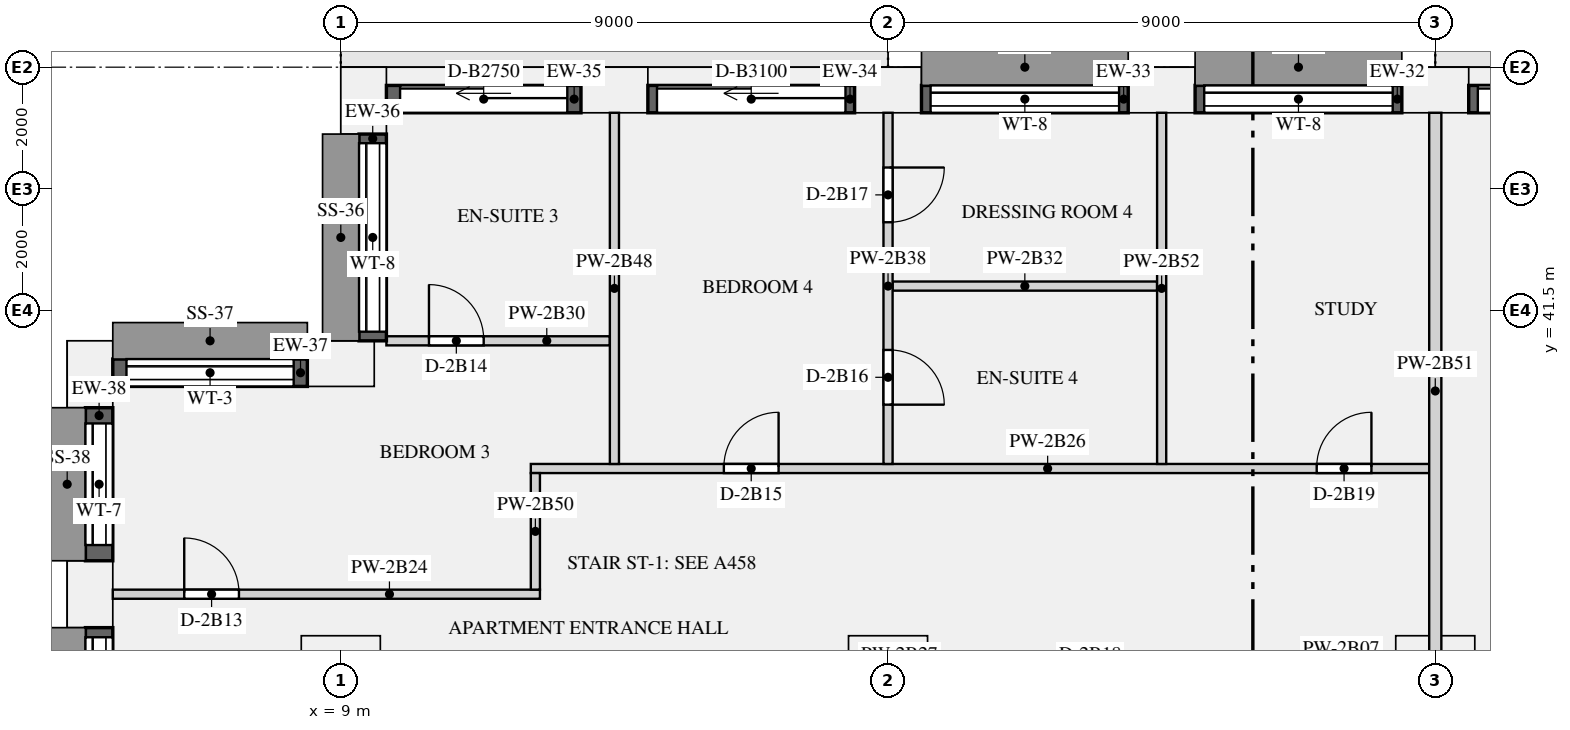
"""IFC4 building model, lengths in metres.
Left out: names, types, materials, properties, quantities, classifications, styles, units other than length and angle.
Written with IfcOpenShell. Run it as: python <this file> out.ifc"""

import sys

from ifc_helpers import new_model, si_unit, direction, frame, frame_2d, origin, origin_2d, place, context, subcontext, project, spatial, rectangle, extrude, element, fill, save


model = new_model("IFC4")
c1 = context("Model", 3, precision=1e-05, world=origin(), true_north=direction((0.0, 1.0)))
c2 = subcontext(c1, "Body", "Model", "MODEL_VIEW")
j1 = project(units=[si_unit("LENGTHUNIT", "METRE"), si_unit("PLANEANGLEUNIT", "RADIAN")], contexts=[c1])
p1 = place(None, origin())
s1 = spatial("IfcSite", under=j1, at=p1, CompositionType="ELEMENT")
p2 = place(p1, origin())
s2 = spatial("IfcBuilding", under=s1, at=p2, CompositionType="ELEMENT")
p3 = place(p2, frame((0.0, 0.0, 93.0)))
s3 = spatial("IfcBuildingStorey", under=s2, at=p3, CompositionType="ELEMENT", Elevation=93.0)
for number, where, z_axis, x_axis in (
    (1, (27.0, 45.125, 0.0), (0.0, 0.0, 1.0), (-1.0, 0.0, 0.0)),
    (2, (22.5, 45.125, 0.0), (0.0, 0.0, 1.0), (-1.0, 0.0, 0.0)),
    (3, (18.0, 45.125, 0.0), (0.0, 0.0, 1.0), (-1.0, 0.0, 0.0)),
    (4, (13.5, 45.125, 0.0), (0.0, 0.0, 1.0), (-1.0, 0.0, 0.0)),
    (5, (9.375, 44.95, 0.0), (0.0, 0.0, 1.0), (0.0, -1.0, 0.0)),
    (6, (9.0, 40.625, 0.0), (0.0, 0.0, 1.0), (-1.0, 0.0, 0.0)),
    (7, (4.875, 40.45, 0.0), (0.0, 0.0, 1.0), (0.0, -1.0, 0.0)),
    (8, (4.875, 36.833, 0.0), (0.0, 0.0, 1.0), (0.0, -1.0, 0.0)),
):
    element("IfcColumn", number, at=place(p3, frame(where, z_axis=z_axis, x_axis=x_axis)), inside=s3, PredefinedType="USERDEFINED", context=c2, shape_type="SweptSolid", body=[
        extrude(rectangle(XDim=1.1, YDim=0.75, at=origin_2d()), origin(), (0.0, 0.0, 1.0), 3.15),
    ])
for number, where, z_axis, x_axis in (
    (9, (9.0, 35.5, 0.0), (0.0, 0.0, 1.0), (1.0, 0.0, 0.0)),
    (10, (18.0, 35.5, 0.0), (0.0, 0.0, 1.0), (1.0, 0.0, 0.0)),
    (11, (27.0, 35.5, 0.0), (0.0, 0.0, 1.0), (1.0, 0.0, 0.0)),
):
    element("IfcColumn", number, at=place(p3, frame(where, z_axis=z_axis, x_axis=x_axis)), inside=s3, PredefinedType="COLUMN", context=c2, shape_type="SweptSolid", body=[
        extrude(rectangle(XDim=1.3, YDim=1.3, at=origin_2d()), origin(), (0.0, 0.0, 1.0), 3.15),
    ])
p4 = place(p3, frame((30.95, 44.975, 0.0), z_axis=(0.0, 0.0, 1.0), x_axis=(-1.0, 0.0, 0.0)))
e12 = element("IfcWall", 12, at=p4, inside=s3, PredefinedType="SOLIDWALL", context=c2, shape_type="SweptSolid", body=[
    extrude(rectangle(XDim=3.4, YDim=0.45, at=frame_2d((1.7, 0.0))), origin(), (0.0, 0.0, 1.0), 2.83),
])
p5 = place(p4, frame((0.15, 0.0, 0.0)))
e13 = element("IfcOpeningElement", 13, at=p5, cuts=e12, PredefinedType="OPENING", context=c2, shape_type="SweptSolid", body=[
    extrude(rectangle(XDim=3.1, YDim=2.3, at=frame_2d((1.55, 1.15))), frame((0.0, 0.235, 0.0), z_axis=(0.0, -1.0, 0.0), x_axis=(1.0, 0.0, 0.0)), (0.0, 0.0, 1.0), 0.47),
])
p6 = place(p3, frame((26.45, 44.975, 0.9), z_axis=(0.0, 0.0, 1.0), x_axis=(-1.0, 0.0, 0.0)))
e14 = element("IfcWall", 14, at=p6, inside=s3, PredefinedType="SOLIDWALL", context=c2, shape_type="SweptSolid", body=[
    extrude(rectangle(XDim=3.4, YDim=0.45, at=frame_2d((1.7, 0.0))), origin(), (0.0, 0.0, 1.0), 1.93),
])
p7 = place(p6, frame((0.15, 0.0, 0.15)))
e15 = element("IfcOpeningElement", 15, at=p7, cuts=e14, PredefinedType="OPENING", context=c2, shape_type="SweptSolid", body=[
    extrude(rectangle(XDim=3.1, YDim=1.5, at=frame_2d((1.55, 0.75))), frame((0.0, 0.235, 0.0), z_axis=(0.0, -1.0, 0.0), x_axis=(1.0, 0.0, 0.0)), (0.0, 0.0, 1.0), 0.47),
])
p8 = place(p3, frame((21.95, 44.975, 0.9), z_axis=(0.0, 0.0, 1.0), x_axis=(-1.0, 0.0, 0.0)))
e16 = element("IfcWall", 16, at=p8, inside=s3, PredefinedType="SOLIDWALL", context=c2, shape_type="SweptSolid", body=[
    extrude(rectangle(XDim=3.4, YDim=0.45, at=frame_2d((1.7, 0.0))), origin(), (0.0, 0.0, 1.0), 1.93),
])
p9 = place(p8, frame((0.15, 0.0, 0.15)))
e17 = element("IfcOpeningElement", 17, at=p9, cuts=e16, PredefinedType="OPENING", context=c2, shape_type="SweptSolid", body=[
    extrude(rectangle(XDim=3.1, YDim=1.5, at=frame_2d((1.55, 0.75))), frame((0.0, 0.235, 0.0), z_axis=(0.0, -1.0, 0.0), x_axis=(1.0, 0.0, 0.0)), (0.0, 0.0, 1.0), 0.47),
])
p10 = place(p3, frame((17.45, 44.975, 0.0), z_axis=(0.0, 0.0, 1.0), x_axis=(-1.0, 0.0, 0.0)))
e18 = element("IfcWall", 18, at=p10, inside=s3, PredefinedType="SOLIDWALL", context=c2, shape_type="SweptSolid", body=[
    extrude(rectangle(XDim=3.4, YDim=0.45, at=frame_2d((1.7, 0.0))), origin(), (0.0, 0.0, 1.0), 2.83),
])
p11 = place(p10, frame((0.15, 0.0, 0.0)))
e19 = element("IfcOpeningElement", 19, at=p11, cuts=e18, PredefinedType="OPENING", context=c2, shape_type="SweptSolid", body=[
    extrude(rectangle(XDim=3.1, YDim=2.3, at=frame_2d((1.55, 1.15))), frame((0.0, 0.235, 0.0), z_axis=(0.0, -1.0, 0.0), x_axis=(1.0, 0.0, 0.0)), (0.0, 0.0, 1.0), 0.47),
])
p12 = place(p3, frame((12.95, 44.975, 0.0), z_axis=(0.0, 0.0, 1.0), x_axis=(-1.0, 0.0, 0.0)))
e20 = element("IfcWall", 20, at=p12, inside=s3, PredefinedType="SOLIDWALL", context=c2, shape_type="SweptSolid", body=[
    extrude(rectangle(XDim=3.2, YDim=0.45, at=frame_2d((1.6, 0.0))), origin(), (0.0, 0.0, 1.0), 2.83),
])
p13 = place(p12, frame((0.225, 0.0, 0.0)))
e21 = element("IfcOpeningElement", 21, at=p13, cuts=e20, PredefinedType="OPENING", context=c2, shape_type="SweptSolid", body=[
    extrude(rectangle(XDim=2.75, YDim=2.3, at=frame_2d((1.375, 1.15))), frame((0.0, 0.235, 0.0), z_axis=(0.0, -1.0, 0.0), x_axis=(1.0, 0.0, 0.0)), (0.0, 0.0, 1.0), 0.47),
])
p14 = place(p3, frame((9.525, 44.4, 0.9), z_axis=(0.0, 0.0, 1.0), x_axis=(0.0, -1.0, 0.0)))
e22 = element("IfcWall", 22, at=p14, inside=s3, PredefinedType="SOLIDWALL", context=c2, shape_type="SweptSolid", body=[
    extrude(rectangle(XDim=3.4, YDim=0.45, at=frame_2d((1.7, 0.0))), origin(), (0.0, 0.0, 1.0), 1.93),
])
p15 = place(p14, frame((0.15, 0.0, 0.15)))
e23 = element("IfcOpeningElement", 23, at=p15, cuts=e22, PredefinedType="OPENING", context=c2, shape_type="SweptSolid", body=[
    extrude(rectangle(XDim=3.1, YDim=1.5, at=frame_2d((1.55, 0.75))), frame((0.0, 0.235, 0.0), z_axis=(0.0, -1.0, 0.0), x_axis=(1.0, 0.0, 0.0)), (0.0, 0.0, 1.0), 0.47),
])
p16 = place(p3, frame((8.45, 40.475, 0.9), z_axis=(0.0, 0.0, 1.0), x_axis=(-1.0, 0.0, 0.0)))
e24 = element("IfcWall", 24, at=p16, inside=s3, PredefinedType="SOLIDWALL", context=c2, shape_type="SweptSolid", body=[
    extrude(rectangle(XDim=3.2, YDim=0.45, at=frame_2d((1.6, 0.0))), origin(), (0.0, 0.0, 1.0), 1.93),
])
p17 = place(p16, frame((0.225, 0.0, 0.15)))
e25 = element("IfcOpeningElement", 25, at=p17, cuts=e24, PredefinedType="OPENING", context=c2, shape_type="SweptSolid", body=[
    extrude(rectangle(XDim=2.75, YDim=1.5, at=frame_2d((1.375, 0.75))), frame((0.0, 0.235, 0.0), z_axis=(0.0, -1.0, 0.0), x_axis=(1.0, 0.0, 0.0)), (0.0, 0.0, 1.0), 0.47),
])
p18 = place(p3, frame((5.025, 39.9, 0.9), z_axis=(0.0, 0.0, 1.0), x_axis=(0.0, -1.0, 0.0)))
e26 = element("IfcWall", 26, at=p18, inside=s3, PredefinedType="SOLIDWALL", context=c2, shape_type="SweptSolid", body=[
    extrude(rectangle(XDim=2.517, YDim=0.45, at=frame_2d((1.258, 0.0))), origin(), (0.0, 0.0, 1.0), 1.93),
])
p19 = place(p18, frame((0.259, 0.0, 0.15)))
e27 = element("IfcOpeningElement", 27, at=p19, cuts=e26, PredefinedType="OPENING", context=c2, shape_type="SweptSolid", body=[
    extrude(rectangle(XDim=2.0, YDim=1.5, at=frame_2d((1.0, 0.75))), frame((0.0, 0.235, 0.0), z_axis=(0.0, -1.0, 0.0), x_axis=(1.0, 0.0, 0.0)), (0.0, 0.0, 1.0), 0.47),
])
p20 = place(p3, frame((5.025, 36.283, 0.9), z_axis=(0.0, 0.0, 1.0), x_axis=(0.0, -1.0, 0.0)))
e28 = element("IfcWall", 28, at=p20, inside=s3, PredefinedType="SOLIDWALL", context=c2, shape_type="SweptSolid", body=[
    extrude(rectangle(XDim=3.066, YDim=0.45, at=frame_2d((1.533, 0.0))), origin(), (0.0, 0.0, 1.0), 1.93),
])
p21 = place(p20, frame((0.158, 0.0, 0.15)))
e29 = element("IfcOpeningElement", 29, at=p21, cuts=e28, PredefinedType="OPENING", context=c2, shape_type="SweptSolid", body=[
    extrude(rectangle(XDim=2.75, YDim=1.5, at=frame_2d((1.375, 0.75))), frame((0.0, 0.235, 0.0), z_axis=(0.0, -1.0, 0.0), x_axis=(1.0, 0.0, 0.0)), (0.0, 0.0, 1.0), 0.47),
])
p22 = place(p3, frame((5.25, 36.833, 0.0), z_axis=(0.0, 0.0, 1.0), x_axis=(1.0, 0.0, 0.0)))
e30 = element("IfcWall", 30, at=p22, inside=s3, PredefinedType="PARTITIONING", context=c2, shape_type="SweptSolid", body=[
    extrude(rectangle(XDim=7.025, YDim=0.15, at=frame_2d((3.512, 0.0))), origin(), (0.0, 0.0, 1.0), 2.83),
])
p23 = place(p22, frame((1.175, 0.0, 0.0)))
e31 = element("IfcOpeningElement", 31, at=p23, cuts=e30, PredefinedType="OPENING", context=c2, shape_type="SweptSolid", body=[
    extrude(rectangle(XDim=0.9, YDim=2.1, at=frame_2d((0.45, 1.05))), frame((0.0, 0.085, 0.0), z_axis=(0.0, -1.0, 0.0), x_axis=(1.0, 0.0, 0.0)), (0.0, 0.0, 1.0), 0.17),
])
p24 = place(p3, frame((12.125, 38.9, 0.0), z_axis=(0.0, 0.0, 1.0), x_axis=(1.0, 0.0, 0.0)))
e32 = element("IfcWall", 32, at=p24, inside=s3, PredefinedType="PARTITIONING", context=c2, shape_type="SweptSolid", body=[
    extrude(rectangle(XDim=14.775, YDim=0.15, at=frame_2d((7.387, 0.0))), origin(), (0.0, 0.0, 1.0), 2.83),
])
p25 = place(p24, frame((3.175, 0.0, 0.0)))
e33 = element("IfcOpeningElement", 33, at=p25, cuts=e32, PredefinedType="OPENING", context=c2, shape_type="SweptSolid", body=[
    extrude(rectangle(XDim=0.9, YDim=2.1, at=frame_2d((0.45, 1.05))), frame((0.0, 0.085, 0.0), z_axis=(0.0, -1.0, 0.0), x_axis=(1.0, 0.0, 0.0)), (0.0, 0.0, 1.0), 0.17),
])
p26 = place(p24, frame((12.925, 0.0, 0.0)))
e34 = element("IfcOpeningElement", 34, at=p26, cuts=e32, PredefinedType="OPENING", context=c2, shape_type="SweptSolid", body=[
    extrude(rectangle(XDim=0.9, YDim=2.1, at=frame_2d((0.45, 1.05))), frame((0.0, 0.085, 0.0), z_axis=(0.0, -1.0, 0.0), x_axis=(1.0, 0.0, 0.0)), (0.0, 0.0, 1.0), 0.17),
])
p27 = place(p3, frame((9.75, 41.0, 0.0), z_axis=(0.0, 0.0, 1.0), x_axis=(1.0, 0.0, 0.0)))
e35 = element("IfcWall", 35, at=p27, inside=s3, PredefinedType="PARTITIONING", context=c2, shape_type="SweptSolid", body=[
    extrude(rectangle(XDim=3.675, YDim=0.15, at=frame_2d((1.837, 0.0))), origin(), (0.0, 0.0, 1.0), 2.83),
])
p28 = place(p27, frame((0.7, 0.0, 0.0)))
e36 = element("IfcOpeningElement", 36, at=p28, cuts=e35, PredefinedType="OPENING", context=c2, shape_type="SweptSolid", body=[
    extrude(rectangle(XDim=0.9, YDim=2.1, at=frame_2d((0.45, 1.05))), frame((0.0, 0.085, 0.0), z_axis=(0.0, -1.0, 0.0), x_axis=(1.0, 0.0, 0.0)), (0.0, 0.0, 1.0), 0.17),
])
p29 = place(p3, frame((18.075, 41.9, 0.0), z_axis=(0.0, 0.0, 1.0), x_axis=(1.0, 0.0, 0.0)))
e37 = element("IfcWall", 37, at=p29, inside=s3, PredefinedType="PARTITIONING", context=c2, shape_type="SweptSolid", body=[
    extrude(rectangle(XDim=4.35, YDim=0.15, at=frame_2d((2.175, 0.0))), origin(), (0.0, 0.0, 1.0), 2.83),
])
p30 = place(p3, frame((18.0, 38.975, 0.0), z_axis=(0.0, 0.0, 1.0), x_axis=(0.0, 1.0, 0.0)))
e38 = element("IfcWall", 38, at=p30, inside=s3, PredefinedType="PARTITIONING", context=c2, shape_type="SweptSolid", body=[
    extrude(rectangle(XDim=5.775, YDim=0.15, at=frame_2d((2.887, 0.0))), origin(), (0.0, 0.0, 1.0), 2.83),
])
p31 = place(p30, frame((0.975, 0.0, 0.0)))
e39 = element("IfcOpeningElement", 39, at=p31, cuts=e38, PredefinedType="OPENING", context=c2, shape_type="SweptSolid", body=[
    extrude(rectangle(XDim=0.9, YDim=2.1, at=frame_2d((0.45, 1.05))), frame((0.0, 0.085, 0.0), z_axis=(0.0, -1.0, 0.0), x_axis=(1.0, 0.0, 0.0)), (0.0, 0.0, 1.0), 0.17),
])
p32 = place(p30, frame((3.975, 0.0, 0.0)))
e40 = element("IfcOpeningElement", 40, at=p32, cuts=e38, PredefinedType="OPENING", context=c2, shape_type="SweptSolid", body=[
    extrude(rectangle(XDim=0.9, YDim=2.1, at=frame_2d((0.45, 1.05))), frame((0.0, 0.085, 0.0), z_axis=(0.0, -1.0, 0.0), x_axis=(1.0, 0.0, 0.0)), (0.0, 0.0, 1.0), 0.17),
])
p33 = place(p3, frame((13.5, 38.975, 0.0), z_axis=(0.0, 0.0, 1.0), x_axis=(0.0, 1.0, 0.0)))
e41 = element("IfcWall", 41, at=p33, inside=s3, PredefinedType="PARTITIONING", context=c2, shape_type="SweptSolid", body=[
    extrude(rectangle(XDim=5.775, YDim=0.15, at=frame_2d((2.887, 0.0))), origin(), (0.0, 0.0, 1.0), 2.83),
])
p34 = place(p3, frame((12.2, 36.908, 0.0), z_axis=(0.0, 0.0, 1.0), x_axis=(0.0, 1.0, 0.0)))
e42 = element("IfcWall", 42, at=p34, inside=s3, PredefinedType="PARTITIONING", context=c2, shape_type="SweptSolid", body=[
    extrude(rectangle(XDim=1.917, YDim=0.15, at=frame_2d((0.958, 0.0))), origin(), (0.0, 0.0, 1.0), 2.83),
])
p35 = place(p3, frame((27.0, 35.6, 0.0), z_axis=(0.0, 0.0, 1.0), x_axis=(0.0, 1.0, 0.0)))
e43 = element("IfcWall", 43, at=p35, inside=s3, PredefinedType="PARTITIONING", context=c2, shape_type="SweptSolid", body=[
    extrude(rectangle(XDim=9.15, YDim=0.2, at=frame_2d((4.575, 0.0))), origin(), (0.0, 0.0, 1.0), 2.83),
])
p36 = place(p3, frame((22.5, 38.975, 0.0), z_axis=(0.0, 0.0, 1.0), x_axis=(0.0, 1.0, 0.0)))
e44 = element("IfcWall", 44, at=p36, inside=s3, PredefinedType="PARTITIONING", context=c2, shape_type="SweptSolid", body=[
    extrude(rectangle(XDim=5.775, YDim=0.15, at=frame_2d((2.887, 0.0))), origin(), (0.0, 0.0, 1.0), 2.83),
])
p37 = place(p5, origin())
e45 = element("IfcDoor", 45, at=p37, inside=s3, OperationType="SLIDING_TO_LEFT", PredefinedType="DOOR", context=c2, shape_type="SweptSolid", body=[
    extrude(rectangle(XDim=3.1, YDim=2.3, at=frame_2d((1.55, 1.15))), frame((0.0, -0.07, 0.0), z_axis=(0.0, -1.0, 0.0), x_axis=(1.0, 0.0, 0.0)), (0.0, 0.0, 1.0), 0.05),
])
fill(e13, e45)
p38 = place(p7, origin())
e46 = element("IfcWindow", 46, at=p38, inside=s3, PartitioningType="SINGLE_PANEL", PredefinedType="WINDOW", context=c2, shape_type="SweptSolid", body=[
    extrude(rectangle(XDim=3.1, YDim=1.5, at=frame_2d((1.55, 0.75))), frame((0.0, -0.065, 0.0), z_axis=(0.0, -1.0, 0.0), x_axis=(1.0, 0.0, 0.0)), (0.0, 0.0, 1.0), 0.06),
])
fill(e15, e46)
p39 = place(p9, origin())
e47 = element("IfcWindow", 47, at=p39, inside=s3, PartitioningType="SINGLE_PANEL", PredefinedType="WINDOW", context=c2, shape_type="SweptSolid", body=[
    extrude(rectangle(XDim=3.1, YDim=1.5, at=frame_2d((1.55, 0.75))), frame((0.0, -0.065, 0.0), z_axis=(0.0, -1.0, 0.0), x_axis=(1.0, 0.0, 0.0)), (0.0, 0.0, 1.0), 0.06),
])
fill(e17, e47)
p40 = place(p11, origin())
e48 = element("IfcDoor", 48, at=p40, inside=s3, OperationType="SLIDING_TO_LEFT", PredefinedType="DOOR", context=c2, shape_type="SweptSolid", body=[
    extrude(rectangle(XDim=3.1, YDim=2.3, at=frame_2d((1.55, 1.15))), frame((0.0, -0.07, 0.0), z_axis=(0.0, -1.0, 0.0), x_axis=(1.0, 0.0, 0.0)), (0.0, 0.0, 1.0), 0.05),
])
fill(e19, e48)
p41 = place(p13, origin())
e49 = element("IfcDoor", 49, at=p41, inside=s3, OperationType="SLIDING_TO_LEFT", PredefinedType="DOOR", context=c2, shape_type="SweptSolid", body=[
    extrude(rectangle(XDim=2.75, YDim=2.3, at=frame_2d((1.375, 1.15))), frame((0.0, -0.07, 0.0), z_axis=(0.0, -1.0, 0.0), x_axis=(1.0, 0.0, 0.0)), (0.0, 0.0, 1.0), 0.05),
])
fill(e21, e49)
p42 = place(p15, origin())
e50 = element("IfcWindow", 50, at=p42, inside=s3, PartitioningType="SINGLE_PANEL", PredefinedType="WINDOW", context=c2, shape_type="SweptSolid", body=[
    extrude(rectangle(XDim=3.1, YDim=1.5, at=frame_2d((1.55, 0.75))), frame((0.0, -0.065, 0.0), z_axis=(0.0, -1.0, 0.0), x_axis=(1.0, 0.0, 0.0)), (0.0, 0.0, 1.0), 0.06),
])
fill(e23, e50)
p43 = place(p17, origin())
e51 = element("IfcWindow", 51, at=p43, inside=s3, PartitioningType="SINGLE_PANEL", PredefinedType="WINDOW", context=c2, shape_type="SweptSolid", body=[
    extrude(rectangle(XDim=2.75, YDim=1.5, at=frame_2d((1.375, 0.75))), frame((0.0, -0.065, 0.0), z_axis=(0.0, -1.0, 0.0), x_axis=(1.0, 0.0, 0.0)), (0.0, 0.0, 1.0), 0.06),
])
fill(e25, e51)
p44 = place(p19, origin())
e52 = element("IfcWindow", 52, at=p44, inside=s3, PartitioningType="SINGLE_PANEL", PredefinedType="WINDOW", context=c2, shape_type="SweptSolid", body=[
    extrude(rectangle(XDim=2.0, YDim=1.5, at=frame_2d((1.0, 0.75))), frame((0.0, -0.065, 0.0), z_axis=(0.0, -1.0, 0.0), x_axis=(1.0, 0.0, 0.0)), (0.0, 0.0, 1.0), 0.06),
])
fill(e27, e52)
p45 = place(p21, origin())
e53 = element("IfcWindow", 53, at=p45, inside=s3, PartitioningType="SINGLE_PANEL", PredefinedType="WINDOW", context=c2, shape_type="SweptSolid", body=[
    extrude(rectangle(XDim=2.75, YDim=1.5, at=frame_2d((1.375, 0.75))), frame((0.0, -0.065, 0.0), z_axis=(0.0, -1.0, 0.0), x_axis=(1.0, 0.0, 0.0)), (0.0, 0.0, 1.0), 0.06),
])
fill(e29, e53)
p46 = place(p23, origin())
e54 = element("IfcDoor", 54, at=p46, inside=s3, OperationType="SINGLE_SWING_LEFT", PredefinedType="DOOR", context=c2, shape_type="SweptSolid", body=[
    extrude(rectangle(XDim=0.9, YDim=2.1, at=frame_2d((0.45, 1.05))), frame((0.0, 0.025, 0.0), z_axis=(0.0, -1.0, 0.0), x_axis=(1.0, 0.0, 0.0)), (0.0, 0.0, 1.0), 0.05),
])
fill(e31, e54)
p47 = place(p28, origin())
e55 = element("IfcDoor", 55, at=p47, inside=s3, OperationType="SINGLE_SWING_LEFT", PredefinedType="DOOR", context=c2, shape_type="SweptSolid", body=[
    extrude(rectangle(XDim=0.9, YDim=2.1, at=frame_2d((0.45, 1.05))), frame((0.0, 0.025, 0.0), z_axis=(0.0, -1.0, 0.0), x_axis=(1.0, 0.0, 0.0)), (0.0, 0.0, 1.0), 0.05),
])
fill(e36, e55)
p48 = place(p25, origin())
e56 = element("IfcDoor", 56, at=p48, inside=s3, OperationType="SINGLE_SWING_RIGHT", PredefinedType="DOOR", context=c2, shape_type="SweptSolid", body=[
    extrude(rectangle(XDim=0.9, YDim=2.1, at=frame_2d((0.45, 1.05))), frame((0.0, 0.025, 0.0), z_axis=(0.0, -1.0, 0.0), x_axis=(1.0, 0.0, 0.0)), (0.0, 0.0, 1.0), 0.05),
])
fill(e33, e56)
p49 = place(p31, frame((0.9, 0.0, 0.0), z_axis=(0.0, 0.0, 1.0), x_axis=(-1.0, 0.0, 0.0)))
e57 = element("IfcDoor", 57, at=p49, inside=s3, OperationType="SINGLE_SWING_RIGHT", PredefinedType="DOOR", context=c2, shape_type="SweptSolid", body=[
    extrude(rectangle(XDim=0.9, YDim=2.1, at=frame_2d((0.45, 1.05))), frame((0.0, 0.025, 0.0), z_axis=(0.0, -1.0, 0.0), x_axis=(1.0, 0.0, 0.0)), (0.0, 0.0, 1.0), 0.05),
])
fill(e39, e57)
p50 = place(p32, frame((0.9, 0.0, 0.0), z_axis=(0.0, 0.0, 1.0), x_axis=(-1.0, 0.0, 0.0)))
e58 = element("IfcDoor", 58, at=p50, inside=s3, OperationType="SINGLE_SWING_LEFT", PredefinedType="DOOR", context=c2, shape_type="SweptSolid", body=[
    extrude(rectangle(XDim=0.9, YDim=2.1, at=frame_2d((0.45, 1.05))), frame((0.0, 0.025, 0.0), z_axis=(0.0, -1.0, 0.0), x_axis=(1.0, 0.0, 0.0)), (0.0, 0.0, 1.0), 0.05),
])
fill(e40, e58)
p51 = place(p26, origin())
e59 = element("IfcDoor", 59, at=p51, inside=s3, OperationType="SINGLE_SWING_RIGHT", PredefinedType="DOOR", context=c2, shape_type="SweptSolid", body=[
    extrude(rectangle(XDim=0.9, YDim=2.1, at=frame_2d((0.45, 1.05))), frame((0.0, 0.025, 0.0), z_axis=(0.0, -1.0, 0.0), x_axis=(1.0, 0.0, 0.0)), (0.0, 0.0, 1.0), 0.05),
])
fill(e34, e59)
save(model, sys.argv[1])
